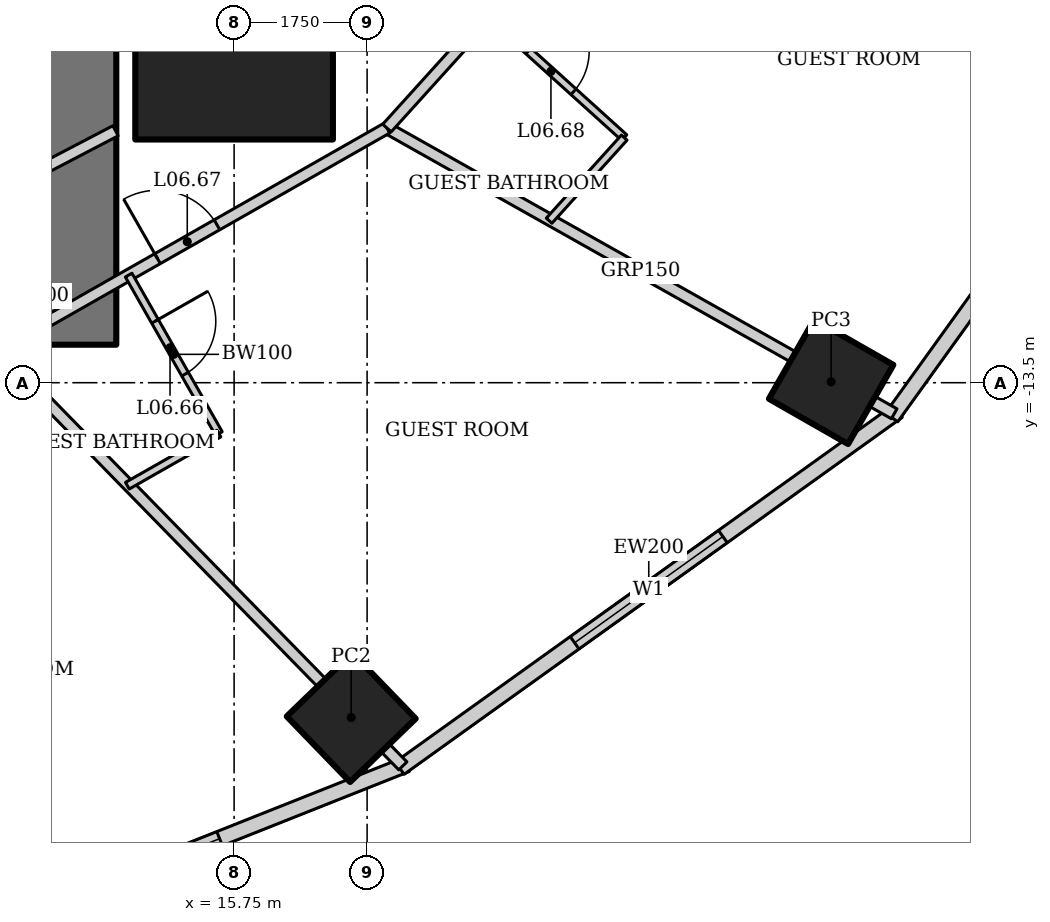
"""IFC4 building model, lengths in metres.
Left out: names, types, materials, properties, quantities, classifications, styles, units other than length and angle.
Written with IfcOpenShell. Run it as: python <this file> out.ifc"""

import sys

from ifc_helpers import new_model, si_unit, direction, frame, frame_2d, origin, origin_2d, place, context, subcontext, project, spatial, rectangle, hollow_rectangle, extrude, element, fill, save


model = new_model("IFC4")
c1 = context("Model", 3, precision=1e-05, world=origin(), true_north=direction((0.0, 1.0)))
c2 = subcontext(c1, "Body", "Model", "MODEL_VIEW")
j1 = project(units=[si_unit("LENGTHUNIT", "METRE"), si_unit("PLANEANGLEUNIT", "RADIAN")], contexts=[c1])
p1 = place(None, origin())
s1 = spatial("IfcSite", under=j1, at=p1, CompositionType="ELEMENT")
p2 = place(p1, origin())
s2 = spatial("IfcBuilding", under=s1, at=p2, CompositionType="ELEMENT")
p3 = place(p2, frame((0.0, 0.0, 37.0)))
s3 = spatial("IfcBuildingStorey", under=s2, at=p3, CompositionType="ELEMENT", Elevation=37.0)
p4 = place(p3, frame((15.75, -9.0, 0.0), z_axis=(0.0, 0.0, 1.0), x_axis=(1.0, 0.0, 0.0)))
e1 = element("IfcColumn", 1, at=p4, inside=s3, PredefinedType="COLUMN", context=c2, shape_type="SweptSolid", body=[
    extrude(hollow_rectangle(XDim=2.6, YDim=2.6, WallThickness=0.13, at=origin_2d()), origin(), (0.0, 0.0, 1.0), 3.6),
])
p5 = place(p3, frame((17.291, -17.905, 0.0), z_axis=(0.0, 0.0, 1.0), x_axis=(0.719339800339, 0.694658370459, 0.0)))
e2 = element("IfcColumn", 2, at=p5, inside=s3, PredefinedType="COLUMN", context=c2, shape_type="SweptSolid", body=[
    extrude(hollow_rectangle(XDim=1.2, YDim=1.2, WallThickness=0.1, at=origin_2d()), origin(), (0.0, 0.0, 1.0), 3.6),
])
p6 = place(p3, frame((23.605, -13.489, 0.0), z_axis=(0.0, 0.0, 1.0), x_axis=(0.496139221777, 0.86824298017, 0.0)))
e3 = element("IfcColumn", 3, at=p6, inside=s3, PredefinedType="COLUMN", context=c2, shape_type="SweptSolid", body=[
    extrude(hollow_rectangle(XDim=1.2, YDim=1.2, WallThickness=0.12, at=origin_2d()), origin(), (0.0, 0.0, 1.0), 3.6),
])
p7 = place(p3, frame((13.2, -13.0, 0.0), z_axis=(0.0, 0.0, 1.0), x_axis=(0.0, 1.0, 0.0)))
e4 = element("IfcWall", 4, at=p7, inside=s3, PredefinedType="SHEAR", context=c2, shape_type="SweptSolid", body=[
    extrude(rectangle(XDim=26.0, YDim=2.0, at=frame_2d((13.0, 0.0))), origin(), (0.0, 0.0, 1.0), 3.6),
])
p8 = place(p7, frame((12.1, 0.0, 0.0)))
e5 = element("IfcOpeningElement", 5, at=p8, cuts=e4, PredefinedType="OPENING", context=c2, shape_type="SweptSolid", body=[
    extrude(rectangle(XDim=1.8, YDim=2.1, at=frame_2d((0.9, 1.05))), frame((0.0, 1.01, 0.0), z_axis=(0.0, -1.0, 0.0), x_axis=(1.0, 0.0, 0.0)), (0.0, 0.0, 1.0), 2.02),
])
p9 = place(p3, frame((10.869, -21.363, 0.0), z_axis=(0.0, 0.0, 1.0), x_axis=(0.929358351251, 0.369178892895, 0.0)))
e6 = element("IfcWall", 6, at=p9, inside=s3, PredefinedType="SOLIDWALL", context=c2, shape_type="SweptSolid", body=[
    extrude(rectangle(XDim=7.692, YDim=0.2, at=frame_2d((3.846, 0.0))), origin(), (0.0, 0.0, 1.0), 3.45),
])
p10 = place(p9, frame((2.646, 0.0, 0.5)))
e7 = element("IfcOpeningElement", 7, at=p10, cuts=e6, PredefinedType="OPENING", context=c2, shape_type="SweptSolid", body=[
    extrude(rectangle(XDim=2.4, YDim=2.2, at=frame_2d((1.2, 1.1))), frame((0.0, 0.11, 0.0), z_axis=(0.0, -1.0, 0.0), x_axis=(1.0, 0.0, 0.0)), (0.0, 0.0, 1.0), 0.22),
])
p11 = place(p3, frame((17.929, -18.572, 0.0), z_axis=(0.0, 0.0, 1.0), x_axis=(0.812791321576, 0.582554948112, 0.0)))
e8 = element("IfcWall", 8, at=p11, inside=s3, PredefinedType="SOLIDWALL", context=c2, shape_type="SweptSolid", body=[
    extrude(rectangle(XDim=8.063, YDim=0.2, at=frame_2d((4.032, 0.0))), origin(), (0.0, 0.0, 1.0), 3.45),
])
p12 = place(p11, frame((2.832, 0.0, 0.5)))
e9 = element("IfcOpeningElement", 9, at=p12, cuts=e8, PredefinedType="OPENING", context=c2, shape_type="SweptSolid", body=[
    extrude(rectangle(XDim=2.4, YDim=2.2, at=frame_2d((1.2, 1.1))), frame((0.0, 0.11, 0.0), z_axis=(0.0, -1.0, 0.0), x_axis=(1.0, 0.0, 0.0)), (0.0, 0.0, 1.0), 0.22),
])
p13 = place(p3, frame((24.4, -13.957, 0.0), z_axis=(0.0, 0.0, 1.0), x_axis=(0.583937613703, 0.811798536155, 0.0)))
e10 = element("IfcWall", 10, at=p13, inside=s3, PredefinedType="SOLIDWALL", context=c2, shape_type="SweptSolid", body=[
    extrude(rectangle(XDim=8.323, YDim=0.2, at=frame_2d((4.162, 0.0))), origin(), (0.0, 0.0, 1.0), 3.45),
])
p14 = place(p13, frame((2.961, 0.0, 0.5)))
e11 = element("IfcOpeningElement", 11, at=p14, cuts=e10, PredefinedType="OPENING", context=c2, shape_type="SweptSolid", body=[
    extrude(rectangle(XDim=2.4, YDim=2.2, at=frame_2d((1.2, 1.1))), frame((0.0, 0.11, 0.0), z_axis=(0.0, -1.0, 0.0), x_axis=(1.0, 0.0, 0.0)), (0.0, 0.0, 1.0), 0.22),
])
p15 = place(p3, frame((17.97, -18.542, 0.0), z_axis=(0.0, 0.0, 1.0), x_axis=(-0.699032031211, 0.715090357467, 0.0)))
e12 = element("IfcWall", 12, at=p15, inside=s3, PredefinedType="PARTITIONING", context=c2, shape_type="SweptSolid", body=[
    extrude(rectangle(XDim=7.647, YDim=0.15, at=frame_2d((3.824, 0.0))), origin(), (0.0, 0.0, 1.0), 2.528),
])
p16 = place(p3, frame((24.435, -13.909, 0.0), z_axis=(0.0, 0.0, 1.0), x_axis=(-0.871267209855, 0.490808974074, 0.0)))
e13 = element("IfcWall", 13, at=p16, inside=s3, PredefinedType="PARTITIONING", context=c2, shape_type="SweptSolid", body=[
    extrude(rectangle(XDim=7.659, YDim=0.15, at=frame_2d((3.83, 0.0))), origin(), (0.0, 0.0, 1.0), 2.693),
])
p17 = place(p3, frame((12.625, -13.073, 0.0), z_axis=(0.0, 0.0, 1.0), x_axis=(0.86907565943, 0.494679187136, 0.0)))
e14 = element("IfcWall", 14, at=p17, inside=s3, PredefinedType="PARTITIONING", context=c2, shape_type="SweptSolid", body=[
    extrude(rectangle(XDim=5.911, YDim=0.15, at=frame_2d((2.955, 0.0))), origin(), (0.0, 0.0, 1.0), 3.45),
])
p18 = place(p17, frame((2.437, 0.0, 0.0)))
e15 = element("IfcOpeningElement", 15, at=p18, cuts=e14, PredefinedType="OPENING", context=c2, shape_type="SweptSolid", body=[
    extrude(rectangle(XDim=0.9, YDim=2.1, at=frame_2d((0.45, 1.05))), frame((0.0, 0.085, 0.0), z_axis=(0.0, -1.0, 0.0), x_axis=(1.0, 0.0, 0.0)), (0.0, 0.0, 1.0), 0.17),
])
p19 = place(p3, frame((17.761, -10.149, 0.0), z_axis=(0.0, 0.0, 1.0), x_axis=(0.670598380282, 0.741820606591, 0.0)))
e16 = element("IfcWall", 16, at=p19, inside=s3, PredefinedType="PARTITIONING", context=c2, shape_type="SweptSolid", body=[
    extrude(rectangle(XDim=6.293, YDim=0.15, at=frame_2d((3.147, 0.0))), origin(), (0.0, 0.0, 1.0), 3.45),
])
p20 = place(p19, frame((5.244, 0.0, 0.0)))
e17 = element("IfcOpeningElement", 17, at=p20, cuts=e16, PredefinedType="OPENING", context=c2, shape_type="SweptSolid", body=[
    extrude(rectangle(XDim=0.9, YDim=2.1, at=frame_2d((0.45, 1.05))), frame((0.0, 0.085, 0.0), z_axis=(0.0, -1.0, 0.0), x_axis=(1.0, 0.0, 0.0)), (0.0, 0.0, 1.0), 0.17),
])
p21 = place(p3, frame((14.363, -12.084, 0.0), z_axis=(0.0, 0.0, 1.0), x_axis=(0.494703113698, -0.869062039959, 0.0)))
e18 = element("IfcWall", 18, at=p21, inside=s3, PredefinedType="PARTITIONING", context=c2, shape_type="SweptSolid", body=[
    extrude(rectangle(XDim=2.4, YDim=0.1, at=frame_2d((1.2, 0.0))), origin(), (0.0, 0.0, 1.0), 3.45),
])
p22 = place(p21, frame((0.7, 0.0, 0.0)))
e19 = element("IfcOpeningElement", 19, at=p22, cuts=e18, PredefinedType="OPENING", context=c2, shape_type="SweptSolid", body=[
    extrude(rectangle(XDim=0.8, YDim=2.1, at=frame_2d((0.4, 1.05))), frame((0.0, 0.06, 0.0), z_axis=(0.0, -1.0, 0.0), x_axis=(1.0, 0.0, 0.0)), (0.0, 0.0, 1.0), 0.12),
])
p23 = place(p3, frame((15.55, -14.17, 0.0), z_axis=(0.0, 0.0, 1.0), x_axis=(-0.869065896633, -0.494696338485, 0.0)))
e20 = element("IfcWall", 20, at=p23, inside=s3, PredefinedType="PARTITIONING", context=c2, shape_type="SweptSolid", body=[
    extrude(rectangle(XDim=1.386, YDim=0.1, at=frame_2d((0.693, 0.0))), origin(), (0.0, 0.0, 1.0), 3.45),
])
p24 = place(p3, frame((19.103, -8.666, 0.0), z_axis=(0.0, 0.0, 1.0), x_axis=(0.741861025859, -0.670553665496, 0.0)))
e21 = element("IfcWall", 21, at=p24, inside=s3, PredefinedType="PARTITIONING", context=c2, shape_type="SweptSolid", body=[
    extrude(rectangle(XDim=2.4, YDim=0.1, at=frame_2d((1.2, 0.0))), origin(), (0.0, 0.0, 1.0), 3.45),
])
p25 = place(p24, frame((0.7, 0.0, 0.0)))
e22 = element("IfcOpeningElement", 22, at=p25, cuts=e21, PredefinedType="OPENING", context=c2, shape_type="SweptSolid", body=[
    extrude(rectangle(XDim=0.8, YDim=2.1, at=frame_2d((0.4, 1.05))), frame((0.0, 0.06, 0.0), z_axis=(0.0, -1.0, 0.0), x_axis=(1.0, 0.0, 0.0)), (0.0, 0.0, 1.0), 0.12),
])
p26 = place(p3, frame((20.883, -10.275, 0.0), z_axis=(0.0, 0.0, 1.0), x_axis=(-0.670592268759, -0.7418261313, 0.0)))
e23 = element("IfcWall", 23, at=p26, inside=s3, PredefinedType="PARTITIONING", context=c2, shape_type="SweptSolid", body=[
    extrude(rectangle(XDim=1.474, YDim=0.1, at=frame_2d((0.737, 0.0))), origin(), (0.0, 0.0, 1.0), 3.45),
])
p27 = place(p3, frame((11.296, -11.698, 0.0), z_axis=(0.0, 0.0, 1.0), x_axis=(0.886283344337, 0.463143426544, 0.0)))
e24 = element("IfcWall", 24, at=p27, inside=s3, PredefinedType="PARTITIONING", context=c2, shape_type="SweptSolid", body=[
    extrude(rectangle(XDim=3.265, YDim=0.15, at=frame_2d((1.633, 0.0))), origin(), (0.0, 0.0, 1.0), 3.45),
])
p28 = place(p10, origin())
e25 = element("IfcWindow", 25, at=p28, inside=s3, PartitioningType="SINGLE_PANEL", PredefinedType="WINDOW", context=c2, shape_type="SweptSolid", body=[
    extrude(rectangle(XDim=2.4, YDim=2.2, at=frame_2d((1.2, 1.1))), frame((0.0, 0.03, 0.0), z_axis=(0.0, -1.0, 0.0), x_axis=(1.0, 0.0, 0.0)), (0.0, 0.0, 1.0), 0.06),
])
fill(e7, e25)
p29 = place(p12, origin())
e26 = element("IfcWindow", 26, at=p29, inside=s3, PartitioningType="SINGLE_PANEL", PredefinedType="WINDOW", context=c2, shape_type="SweptSolid", body=[
    extrude(rectangle(XDim=2.4, YDim=2.2, at=frame_2d((1.2, 1.1))), frame((0.0, 0.03, 0.0), z_axis=(0.0, -1.0, 0.0), x_axis=(1.0, 0.0, 0.0)), (0.0, 0.0, 1.0), 0.06),
])
fill(e9, e26)
p30 = place(p22, origin())
e27 = element("IfcDoor", 27, at=p30, inside=s3, OperationType="SINGLE_SWING_LEFT", PredefinedType="DOOR", context=c2, shape_type="SweptSolid", body=[
    extrude(rectangle(XDim=0.8, YDim=2.1, at=frame_2d((0.4, 1.05))), frame((0.0, 0.025, 0.0), z_axis=(0.0, -1.0, 0.0), x_axis=(1.0, 0.0, 0.0)), (0.0, 0.0, 1.0), 0.05),
])
fill(e19, e27)
p31 = place(p18, origin())
e28 = element("IfcDoor", 28, at=p31, inside=s3, OperationType="SINGLE_SWING_LEFT", PredefinedType="DOOR", context=c2, shape_type="SweptSolid", body=[
    extrude(rectangle(XDim=0.9, YDim=2.1, at=frame_2d((0.45, 1.05))), frame((0.0, 0.025, 0.0), z_axis=(0.0, -1.0, 0.0), x_axis=(1.0, 0.0, 0.0)), (0.0, 0.0, 1.0), 0.05),
])
fill(e15, e28)
p32 = place(p25, origin())
e29 = element("IfcDoor", 29, at=p32, inside=s3, OperationType="SINGLE_SWING_LEFT", PredefinedType="DOOR", context=c2, shape_type="SweptSolid", body=[
    extrude(rectangle(XDim=0.8, YDim=2.1, at=frame_2d((0.4, 1.05))), frame((0.0, 0.025, 0.0), z_axis=(0.0, -1.0, 0.0), x_axis=(1.0, 0.0, 0.0)), (0.0, 0.0, 1.0), 0.05),
])
fill(e22, e29)
save(model, sys.argv[1])
